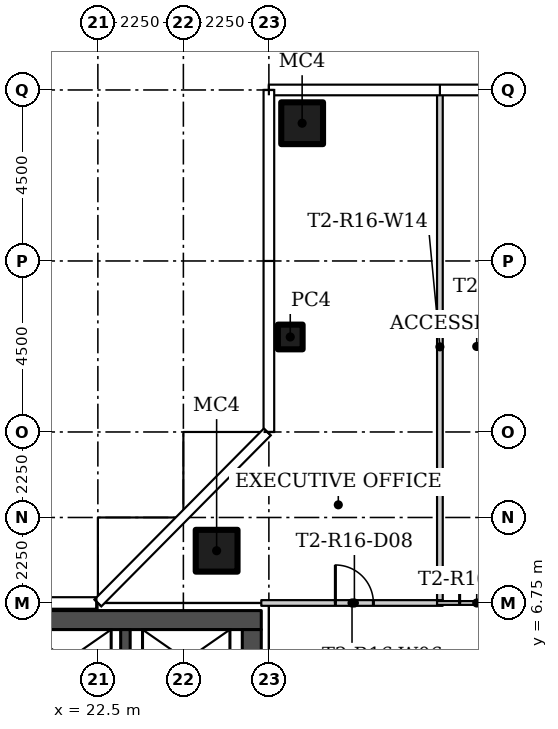
"""IFC4 building model, lengths in metres.
Left out: names, types, materials, properties, quantities, classifications, styles, units other than length and angle.
Written with IfcOpenShell. Run it as: python <this file> out.ifc"""

import sys

from ifc_helpers import new_model, si_unit, direction, frame, frame_2d, origin, origin_2d, place, context, subcontext, project, spatial, rectangle, hollow_rectangle, extrude, element, fill, save


model = new_model("IFC4")
c1 = context("Model", 3, precision=1e-05, world=origin(), true_north=direction((0.0, 1.0)))
c2 = subcontext(c1, "Body", "Model", "MODEL_VIEW")
j1 = project(units=[si_unit("LENGTHUNIT", "METRE"), si_unit("PLANEANGLEUNIT", "RADIAN")], contexts=[c1])
p1 = place(None, origin())
s1 = spatial("IfcSite", under=j1, at=p1, CompositionType="ELEMENT")
p2 = place(p1, origin())
s2 = spatial("IfcBuilding", under=s1, at=p2, CompositionType="ELEMENT")
p3 = place(p2, frame((0.0, 0.0, 146.7)))
s3 = spatial("IfcBuildingStorey", under=s2, at=p3, CompositionType="ELEMENT", Elevation=146.7)
p4 = place(p3, frame((25.625, 8.125, 0.0)))
e1 = element("IfcColumn", 1, at=p4, inside=s3, PredefinedType="COLUMN", context=c2, shape_type="SweptSolid", body=[
    extrude(hollow_rectangle(XDim=1.1, YDim=1.1, WallThickness=0.04, at=origin_2d()), origin(), (0.0, 0.0, 1.0), 3.55),
])
p5 = place(p3, frame((27.562, 13.75, 0.0)))
e2 = element("IfcColumn", 2, at=p5, inside=s3, PredefinedType="COLUMN", context=c2, shape_type="SweptSolid", body=[
    extrude(hollow_rectangle(XDim=0.65, YDim=0.65, WallThickness=0.02, at=origin_2d()), origin(), (0.0, 0.0, 1.0), 3.55),
])
p6 = place(p3, frame((27.875, 19.375, 0.0)))
e3 = element("IfcColumn", 3, at=p6, inside=s3, PredefinedType="COLUMN", context=c2, shape_type="SweptSolid", body=[
    extrude(hollow_rectangle(XDim=1.1, YDim=1.1, WallThickness=0.04, at=origin_2d()), origin(), (0.0, 0.0, 1.0), 3.55),
])
p7 = place(p3, frame((26.8, 6.75, 0.0)))
e4 = element("IfcWall", 4, at=p7, inside=s3, PredefinedType="PARTITIONING", context=c2, shape_type="SweptSolid", body=[
    extrude(rectangle(XDim=4.775, YDim=0.15, at=frame_2d((2.387, 0.0))), origin(), (0.0, 0.0, 1.0), 3.55),
])
p8 = place(p7, frame((1.95, 0.0, 0.0)))
e5 = element("IfcOpeningElement", 5, at=p8, cuts=e4, PredefinedType="OPENING", context=c2, shape_type="SweptSolid", body=[
    extrude(rectangle(XDim=1.0, YDim=2.4, at=frame_2d((0.5, 1.2))), frame((0.0, 0.085, 0.0), z_axis=(0.0, -1.0, 0.0), x_axis=(1.0, 0.0, 0.0)), (0.0, 0.0, 1.0), 0.17),
])
p9 = place(p3, frame((31.425, 6.75, 0.0)))
e6 = element("IfcWall", 6, at=p9, inside=s3, PredefinedType="PARTITIONING", context=c2, shape_type="SweptSolid", body=[
    extrude(rectangle(XDim=4.65, YDim=0.1, at=frame_2d((2.325, 0.0))), origin(), (0.0, 0.0, 1.0), 3.55),
])
p10 = place(p9, frame((2.844, 0.0, 0.0)))
e7 = element("IfcOpeningElement", 7, at=p10, cuts=e6, PredefinedType="OPENING", context=c2, shape_type="SweptSolid", body=[
    extrude(rectangle(XDim=0.9, YDim=2.1, at=frame_2d((0.45, 1.05))), frame((0.0, 0.06, 0.0), z_axis=(0.0, -1.0, 0.0), x_axis=(1.0, 0.0, 0.0)), (0.0, 0.0, 1.0), 0.12),
])
p11 = place(p9, frame((0.594, 0.0, 0.0)))
e8 = element("IfcOpeningElement", 8, at=p11, cuts=e6, PredefinedType="OPENING", context=c2, shape_type="SweptSolid", body=[
    extrude(rectangle(XDim=0.9, YDim=2.1, at=frame_2d((0.45, 1.05))), frame((0.0, 0.06, 0.0), z_axis=(0.0, -1.0, 0.0), x_axis=(1.0, 0.0, 0.0)), (0.0, 0.0, 1.0), 0.12),
])
p12 = place(p3, frame((31.5, 20.155, 0.0), z_axis=(0.0, 0.0, 1.0), x_axis=(0.0, -1.0, 0.0)))
e9 = element("IfcWall", 9, at=p12, inside=s3, PredefinedType="PARTITIONING", context=c2, shape_type="SweptSolid", body=[
    extrude(rectangle(XDim=13.33, YDim=0.15, at=frame_2d((6.665, 0.0))), origin(), (0.0, 0.0, 1.0), 3.55),
])
p13 = place(p3, frame((13.7, 6.3, 0.0)))
e10 = element("IfcWall", 10, at=p13, inside=s3, PredefinedType="SHEAR", context=c2, shape_type="SweptSolid", body=[
    extrude(rectangle(XDim=13.1, YDim=0.5, at=frame_2d((6.55, 0.0))), origin(), (0.0, 0.0, 1.0), 3.55),
])
p14 = place(p3, frame((26.55, 6.05, 0.0), z_axis=(0.0, 0.0, 1.0), x_axis=(0.0, -1.0, 0.0)))
e11 = element("IfcWall", 11, at=p14, inside=s3, PredefinedType="SHEAR", context=c2, shape_type="SweptSolid", body=[
    extrude(rectangle(XDim=12.1, YDim=0.5, at=frame_2d((6.05, 0.0))), origin(), (0.0, 0.0, 1.0), 3.55),
])
p15 = place(p14, frame((10.1, 0.0, 0.0)))
e12 = element("IfcOpeningElement", 12, at=p15, cuts=e11, PredefinedType="OPENING", context=c2, shape_type="SweptSolid", body=[
    extrude(rectangle(XDim=1.2, YDim=2.1, at=frame_2d((0.6, 1.05))), frame((0.0, 0.26, 0.0), z_axis=(0.0, -1.0, 0.0), x_axis=(1.0, 0.0, 0.0)), (0.0, 0.0, 1.0), 0.52),
])
p16 = place(p14, frame((3.9, 0.0, 0.0)))
e13 = element("IfcOpeningElement", 13, at=p16, cuts=e11, PredefinedType="OPENING", context=c2, shape_type="SweptSolid", body=[
    extrude(rectangle(XDim=1.8, YDim=2.4, at=frame_2d((0.9, 1.2))), frame((0.0, 0.26, 0.0), z_axis=(0.0, -1.0, 0.0), x_axis=(1.0, 0.0, 0.0)), (0.0, 0.0, 1.0), 0.52),
])
p17 = place(p3, frame((23.225, 3.25, 0.0), z_axis=(0.0, 0.0, 1.0), x_axis=(0.0, 1.0, 0.0)))
e14 = element("IfcWall", 14, at=p17, inside=s3, PredefinedType="SHEAR", context=c2, shape_type="SweptSolid", body=[
    extrude(rectangle(XDim=2.8, YDim=0.25, at=frame_2d((1.4, 0.0))), origin(), (0.0, 0.0, 1.0), 3.55),
])
p18 = place(p11, origin())
e15 = element("IfcDoor", 15, at=p18, inside=s3, OperationType="SINGLE_SWING_RIGHT", PredefinedType="DOOR", context=c2, shape_type="SweptSolid", body=[
    extrude(rectangle(XDim=0.9, YDim=2.1, at=frame_2d((0.45, 1.05))), frame((0.0, 0.025, 0.0), z_axis=(0.0, -1.0, 0.0), x_axis=(1.0, 0.0, 0.0)), (0.0, 0.0, 1.0), 0.05),
])
fill(e8, e15)
p19 = place(p8, origin())
e16 = element("IfcDoor", 16, at=p19, inside=s3, OperationType="SINGLE_SWING_RIGHT", PredefinedType="DOOR", context=c2, shape_type="SweptSolid", body=[
    extrude(rectangle(XDim=1.0, YDim=2.4, at=frame_2d((0.5, 1.2))), frame((0.0, 0.025, 0.0), z_axis=(0.0, -1.0, 0.0), x_axis=(1.0, 0.0, 0.0)), (0.0, 0.0, 1.0), 0.05),
])
fill(e5, e16)
save(model, sys.argv[1])
